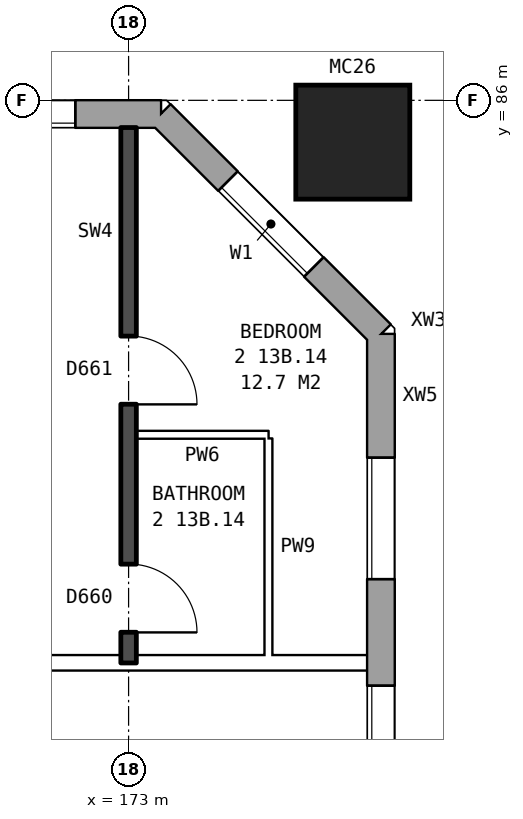
"""IFC4 building model, lengths in metres.
Left out: names, types, materials, properties, quantities, classifications, styles, units other than length and angle.
Written with IfcOpenShell. Run it as: python <this file> out.ifc"""

import sys

from ifc_helpers import new_model, si_unit, direction, frame, frame_2d, origin, origin_2d, place, context, subcontext, project, spatial, rectangle, hollow_rectangle, extrude, element, fill, save


model = new_model("IFC4")
c1 = context("Model", 3, precision=1e-05, world=origin(), true_north=direction((0.0, 1.0)))
c2 = subcontext(c1, "Body", "Model", "MODEL_VIEW")
j1 = project(units=[si_unit("LENGTHUNIT", "METRE"), si_unit("PLANEANGLEUNIT", "RADIAN")], contexts=[c1])
p1 = place(None, origin())
s1 = spatial("IfcSite", under=j1, at=p1, CompositionType="ELEMENT")
p2 = place(p1, origin())
s2 = spatial("IfcBuilding", under=s1, at=p2, CompositionType="ELEMENT")
p3 = place(p2, frame((0.0, 0.0, 50.5)))
s3 = spatial("IfcBuildingStorey", under=s2, at=p3, CompositionType="ELEMENT", Elevation=50.5)
p4 = place(p3, frame((175.95, 85.45, 0.0), z_axis=(0.0, 0.0, 1.0), x_axis=(1.0, 0.0, 0.0)))
e1 = element("IfcColumn", 1, at=p4, inside=s3, PredefinedType="COLUMN", context=c2, shape_type="SweptSolid", body=[
    extrude(hollow_rectangle(XDim=1.5, YDim=1.5, WallThickness=0.08, at=origin_2d()), origin(), (0.0, 0.0, 1.0), 3.1),
])
p5 = place(p3, frame((176.32, 57.075, 0.0), z_axis=(0.0, 0.0, 1.0), x_axis=(0.0, 1.0, 0.0)))
e2 = element("IfcWall", 2, at=p5, inside=s3, PredefinedType="STANDARD", context=c2, shape_type="SweptSolid", body=[
    extrude(rectangle(XDim=25.851, YDim=0.36, at=frame_2d((12.925, 0.0))), origin(), (0.0, 0.0, 1.0), 2.85),
])
p6 = place(p5, frame((1.625, 0.0, 0.8)))
e3 = element("IfcOpeningElement", 3, at=p6, cuts=e2, PredefinedType="OPENING", context=c2, shape_type="SweptSolid", body=[
    extrude(rectangle(XDim=1.6, YDim=1.8, at=frame_2d((0.8, 0.9))), frame((0.0, 0.19, 0.0), z_axis=(0.0, -1.0, 0.0), x_axis=(1.0, 0.0, 0.0)), (0.0, 0.0, 1.0), 0.38),
])
p7 = place(p5, frame((4.625, 0.0, 0.8)))
e4 = element("IfcOpeningElement", 4, at=p7, cuts=e2, PredefinedType="OPENING", context=c2, shape_type="SweptSolid", body=[
    extrude(rectangle(XDim=1.6, YDim=1.8, at=frame_2d((0.8, 0.9))), frame((0.0, 0.19, 0.0), z_axis=(0.0, -1.0, 0.0), x_axis=(1.0, 0.0, 0.0)), (0.0, 0.0, 1.0), 0.38),
])
p8 = place(p5, frame((6.525, 0.0, 0.8)))
e5 = element("IfcOpeningElement", 5, at=p8, cuts=e2, PredefinedType="OPENING", context=c2, shape_type="SweptSolid", body=[
    extrude(rectangle(XDim=1.6, YDim=1.8, at=frame_2d((0.8, 0.9))), frame((0.0, 0.19, 0.0), z_axis=(0.0, -1.0, 0.0), x_axis=(1.0, 0.0, 0.0)), (0.0, 0.0, 1.0), 0.38),
])
p9 = place(p5, frame((8.425, 0.0, 1.1)))
e6 = element("IfcOpeningElement", 6, at=p9, cuts=e2, PredefinedType="OPENING", context=c2, shape_type="SweptSolid", body=[
    extrude(rectangle(XDim=0.8, YDim=1.5, at=frame_2d((0.4, 0.75))), frame((0.0, 0.19, 0.0), z_axis=(0.0, -1.0, 0.0), x_axis=(1.0, 0.0, 0.0)), (0.0, 0.0, 1.0), 0.38),
])
p10 = place(p5, frame((9.525, 0.0, 1.6)))
e7 = element("IfcOpeningElement", 7, at=p10, cuts=e2, PredefinedType="OPENING", context=c2, shape_type="SweptSolid", body=[
    extrude(rectangle(XDim=0.6, YDim=0.9, at=frame_2d((0.3, 0.45))), frame((0.0, 0.19, 0.0), z_axis=(0.0, -1.0, 0.0), x_axis=(1.0, 0.0, 0.0)), (0.0, 0.0, 1.0), 0.38),
])
p11 = place(p5, frame((11.475, 0.0, 0.8)))
e8 = element("IfcOpeningElement", 8, at=p11, cuts=e2, PredefinedType="OPENING", context=c2, shape_type="SweptSolid", body=[
    extrude(rectangle(XDim=0.6, YDim=0.9, at=frame_2d((0.3, 0.45))), frame((0.0, 0.19, 0.0), z_axis=(0.0, -1.0, 0.0), x_axis=(1.0, 0.0, 0.0)), (0.0, 0.0, 1.0), 0.38),
])
p12 = place(p5, frame((19.625, 0.0, 0.8)))
e9 = element("IfcOpeningElement", 9, at=p12, cuts=e2, PredefinedType="OPENING", context=c2, shape_type="SweptSolid", body=[
    extrude(rectangle(XDim=1.6, YDim=1.8, at=frame_2d((0.8, 0.9))), frame((0.0, 0.19, 0.0), z_axis=(0.0, -1.0, 0.0), x_axis=(1.0, 0.0, 0.0)), (0.0, 0.0, 1.0), 0.38),
])
p13 = place(p5, frame((22.625, 0.0, 0.8)))
e10 = element("IfcOpeningElement", 10, at=p13, cuts=e2, PredefinedType="OPENING", context=c2, shape_type="SweptSolid", body=[
    extrude(rectangle(XDim=1.6, YDim=1.8, at=frame_2d((0.8, 0.9))), frame((0.0, 0.19, 0.0), z_axis=(0.0, -1.0, 0.0), x_axis=(1.0, 0.0, 0.0)), (0.0, 0.0, 1.0), 0.38),
])
p14 = place(p5, frame((12.375, 0.0, 0.8)))
e11 = element("IfcOpeningElement", 11, at=p14, cuts=e2, PredefinedType="OPENING", context=c2, shape_type="SweptSolid", body=[
    extrude(rectangle(XDim=1.0, YDim=1.8, at=frame_2d((0.5, 0.9))), frame((0.0, 0.19, 0.0), z_axis=(0.0, -1.0, 0.0), x_axis=(1.0, 0.0, 0.0)), (0.0, 0.0, 1.0), 0.38),
])
p15 = place(p5, frame((13.675, 0.0, 0.8)))
e12 = element("IfcOpeningElement", 12, at=p15, cuts=e2, PredefinedType="OPENING", context=c2, shape_type="SweptSolid", body=[
    extrude(rectangle(XDim=0.6, YDim=0.9, at=frame_2d((0.3, 0.45))), frame((0.0, 0.19, 0.0), z_axis=(0.0, -1.0, 0.0), x_axis=(1.0, 0.0, 0.0)), (0.0, 0.0, 1.0), 0.38),
])
p16 = place(p5, frame((15.575, 0.0, 1.7)))
e13 = element("IfcOpeningElement", 13, at=p16, cuts=e2, PredefinedType="OPENING", context=c2, shape_type="SweptSolid", body=[
    extrude(rectangle(XDim=0.6, YDim=0.9, at=frame_2d((0.3, 0.45))), frame((0.0, 0.19, 0.0), z_axis=(0.0, -1.0, 0.0), x_axis=(1.0, 0.0, 0.0)), (0.0, 0.0, 1.0), 0.38),
])
p17 = place(p5, frame((16.575, 0.0, 1.1)))
e14 = element("IfcOpeningElement", 14, at=p17, cuts=e2, PredefinedType="OPENING", context=c2, shape_type="SweptSolid", body=[
    extrude(rectangle(XDim=0.8, YDim=1.5, at=frame_2d((0.4, 0.75))), frame((0.0, 0.19, 0.0), z_axis=(0.0, -1.0, 0.0), x_axis=(1.0, 0.0, 0.0)), (0.0, 0.0, 1.0), 0.38),
])
p18 = place(p5, frame((17.675, 0.0, 0.8)))
e15 = element("IfcOpeningElement", 15, at=p18, cuts=e2, PredefinedType="OPENING", context=c2, shape_type="SweptSolid", body=[
    extrude(rectangle(XDim=1.6, YDim=1.8, at=frame_2d((0.8, 0.9))), frame((0.0, 0.19, 0.0), z_axis=(0.0, -1.0, 0.0), x_axis=(1.0, 0.0, 0.0)), (0.0, 0.0, 1.0), 0.38),
])
p19 = place(p3, frame((176.32, 82.925, 0.0), z_axis=(0.0, 0.0, 1.0), x_axis=(-0.707106781187, 0.707106781187, 0.0)))
e16 = element("IfcWall", 16, at=p19, inside=s3, PredefinedType="STANDARD", context=c2, shape_type="SweptSolid", body=[
    extrude(rectangle(XDim=4.094, YDim=0.36, at=frame_2d((2.047, 0.0))), origin(), (0.0, 0.0, 1.0), 2.85),
])
p20 = place(p19, frame((1.247, 0.0, 0.8)))
e17 = element("IfcOpeningElement", 17, at=p20, cuts=e16, PredefinedType="OPENING", context=c2, shape_type="SweptSolid", body=[
    extrude(rectangle(XDim=1.6, YDim=1.8, at=frame_2d((0.8, 0.9))), frame((0.0, 0.19, 0.0), z_axis=(0.0, -1.0, 0.0), x_axis=(1.0, 0.0, 0.0)), (0.0, 0.0, 1.0), 0.38),
])
p21 = place(p3, frame((173.425, 85.82, 0.0), z_axis=(0.0, 0.0, 1.0), x_axis=(-1.0, 0.0, 0.0)))
e18 = element("IfcWall", 18, at=p21, inside=s3, PredefinedType="STANDARD", context=c2, shape_type="SweptSolid", body=[
    extrude(rectangle(XDim=39.351, YDim=0.36, at=frame_2d((19.675, 0.0))), origin(), (0.0, 0.0, 1.0), 2.85),
])
p22 = place(p21, frame((1.125, 0.0, 0.8)))
e19 = element("IfcOpeningElement", 19, at=p22, cuts=e18, PredefinedType="OPENING", context=c2, shape_type="SweptSolid", body=[
    extrude(rectangle(XDim=1.6, YDim=1.8, at=frame_2d((0.8, 0.9))), frame((0.0, 0.19, 0.0), z_axis=(0.0, -1.0, 0.0), x_axis=(1.0, 0.0, 0.0)), (0.0, 0.0, 1.0), 0.38),
])
p23 = place(p21, frame((4.125, 0.0, 0.8)))
e20 = element("IfcOpeningElement", 20, at=p23, cuts=e18, PredefinedType="OPENING", context=c2, shape_type="SweptSolid", body=[
    extrude(rectangle(XDim=1.6, YDim=1.8, at=frame_2d((0.8, 0.9))), frame((0.0, 0.19, 0.0), z_axis=(0.0, -1.0, 0.0), x_axis=(1.0, 0.0, 0.0)), (0.0, 0.0, 1.0), 0.38),
])
p24 = place(p21, frame((7.725, 0.0, 0.8)))
e21 = element("IfcOpeningElement", 21, at=p24, cuts=e18, PredefinedType="OPENING", context=c2, shape_type="SweptSolid", body=[
    extrude(rectangle(XDim=0.6, YDim=0.9, at=frame_2d((0.3, 0.45))), frame((0.0, 0.19, 0.0), z_axis=(0.0, -1.0, 0.0), x_axis=(1.0, 0.0, 0.0)), (0.0, 0.0, 1.0), 0.38),
])
p25 = place(p21, frame((10.125, 0.0, 0.8)))
e22 = element("IfcOpeningElement", 22, at=p25, cuts=e18, PredefinedType="OPENING", context=c2, shape_type="SweptSolid", body=[
    extrude(rectangle(XDim=1.6, YDim=1.8, at=frame_2d((0.8, 0.9))), frame((0.0, 0.19, 0.0), z_axis=(0.0, -1.0, 0.0), x_axis=(1.0, 0.0, 0.0)), (0.0, 0.0, 1.0), 0.38),
])
p26 = place(p21, frame((13.125, 0.0, 0.8)))
e23 = element("IfcOpeningElement", 23, at=p26, cuts=e18, PredefinedType="OPENING", context=c2, shape_type="SweptSolid", body=[
    extrude(rectangle(XDim=1.6, YDim=1.8, at=frame_2d((0.8, 0.9))), frame((0.0, 0.19, 0.0), z_axis=(0.0, -1.0, 0.0), x_axis=(1.0, 0.0, 0.0)), (0.0, 0.0, 1.0), 0.38),
])
p27 = place(p21, frame((16.125, 0.0, 0.8)))
e24 = element("IfcOpeningElement", 24, at=p27, cuts=e18, PredefinedType="OPENING", context=c2, shape_type="SweptSolid", body=[
    extrude(rectangle(XDim=1.6, YDim=1.8, at=frame_2d((0.8, 0.9))), frame((0.0, 0.19, 0.0), z_axis=(0.0, -1.0, 0.0), x_axis=(1.0, 0.0, 0.0)), (0.0, 0.0, 1.0), 0.38),
])
p28 = place(p21, frame((19.125, 0.0, 0.8)))
e25 = element("IfcOpeningElement", 25, at=p28, cuts=e18, PredefinedType="OPENING", context=c2, shape_type="SweptSolid", body=[
    extrude(rectangle(XDim=1.6, YDim=1.8, at=frame_2d((0.8, 0.9))), frame((0.0, 0.19, 0.0), z_axis=(0.0, -1.0, 0.0), x_axis=(1.0, 0.0, 0.0)), (0.0, 0.0, 1.0), 0.38),
])
p29 = place(p21, frame((22.125, 0.0, 0.8)))
e26 = element("IfcOpeningElement", 26, at=p29, cuts=e18, PredefinedType="OPENING", context=c2, shape_type="SweptSolid", body=[
    extrude(rectangle(XDim=1.6, YDim=1.8, at=frame_2d((0.8, 0.9))), frame((0.0, 0.19, 0.0), z_axis=(0.0, -1.0, 0.0), x_axis=(1.0, 0.0, 0.0)), (0.0, 0.0, 1.0), 0.38),
])
p30 = place(p21, frame((25.125, 0.0, 0.8)))
e27 = element("IfcOpeningElement", 27, at=p30, cuts=e18, PredefinedType="OPENING", context=c2, shape_type="SweptSolid", body=[
    extrude(rectangle(XDim=1.6, YDim=1.8, at=frame_2d((0.8, 0.9))), frame((0.0, 0.19, 0.0), z_axis=(0.0, -1.0, 0.0), x_axis=(1.0, 0.0, 0.0)), (0.0, 0.0, 1.0), 0.38),
])
p31 = place(p21, frame((28.125, 0.0, 0.8)))
e28 = element("IfcOpeningElement", 28, at=p31, cuts=e18, PredefinedType="OPENING", context=c2, shape_type="SweptSolid", body=[
    extrude(rectangle(XDim=1.6, YDim=1.8, at=frame_2d((0.8, 0.9))), frame((0.0, 0.19, 0.0), z_axis=(0.0, -1.0, 0.0), x_axis=(1.0, 0.0, 0.0)), (0.0, 0.0, 1.0), 0.38),
])
p32 = place(p21, frame((30.625, 0.0, 0.8)))
e29 = element("IfcOpeningElement", 29, at=p32, cuts=e18, PredefinedType="OPENING", context=c2, shape_type="SweptSolid", body=[
    extrude(rectangle(XDim=1.0, YDim=0.9, at=frame_2d((0.5, 0.45))), frame((0.0, 0.19, 0.0), z_axis=(0.0, -1.0, 0.0), x_axis=(1.0, 0.0, 0.0)), (0.0, 0.0, 1.0), 0.38),
])
p33 = place(p21, frame((34.125, 0.0, 0.8)))
e30 = element("IfcOpeningElement", 30, at=p33, cuts=e18, PredefinedType="OPENING", context=c2, shape_type="SweptSolid", body=[
    extrude(rectangle(XDim=1.6, YDim=1.8, at=frame_2d((0.8, 0.9))), frame((0.0, 0.19, 0.0), z_axis=(0.0, -1.0, 0.0), x_axis=(1.0, 0.0, 0.0)), (0.0, 0.0, 1.0), 0.38),
])
p34 = place(p21, frame((37.125, 0.0, 0.8)))
e31 = element("IfcOpeningElement", 31, at=p34, cuts=e18, PredefinedType="OPENING", context=c2, shape_type="SweptSolid", body=[
    extrude(rectangle(XDim=1.6, YDim=1.8, at=frame_2d((0.8, 0.9))), frame((0.0, 0.19, 0.0), z_axis=(0.0, -1.0, 0.0), x_axis=(1.0, 0.0, 0.0)), (0.0, 0.0, 1.0), 0.38),
])
p35 = place(p21, frame((8.625, 0.0, 0.8)))
e32 = element("IfcOpeningElement", 32, at=p35, cuts=e18, PredefinedType="OPENING", context=c2, shape_type="SweptSolid", body=[
    extrude(rectangle(XDim=0.6, YDim=1.5, at=frame_2d((0.3, 0.75))), frame((0.0, 0.19, 0.0), z_axis=(0.0, -1.0, 0.0), x_axis=(1.0, 0.0, 0.0)), (0.0, 0.0, 1.0), 0.38),
])
p36 = place(p21, frame((32.875, 0.0, 1.7)))
e33 = element("IfcOpeningElement", 33, at=p36, cuts=e18, PredefinedType="OPENING", context=c2, shape_type="SweptSolid", body=[
    extrude(rectangle(XDim=0.8, YDim=0.9, at=frame_2d((0.4, 0.45))), frame((0.0, 0.19, 0.0), z_axis=(0.0, -1.0, 0.0), x_axis=(1.0, 0.0, 0.0)), (0.0, 0.0, 1.0), 0.38),
])
p37 = place(p3, frame((155.1, 78.6, 0.0), z_axis=(0.0, 0.0, 1.0), x_axis=(1.0, 0.0, 0.0)))
e34 = element("IfcWall", 34, at=p37, inside=s3, PredefinedType="PARTITIONING", context=c2, shape_type="SweptSolid", body=[
    extrude(rectangle(XDim=21.04, YDim=0.2, at=frame_2d((10.52, 0.0))), origin(), (0.0, 0.0, 1.0), 2.85),
])
p38 = place(p37, frame((2.45, 0.0, 0.0)))
e35 = element("IfcOpeningElement", 35, at=p38, cuts=e34, PredefinedType="OPENING", context=c2, shape_type="SweptSolid", body=[
    extrude(rectangle(XDim=1.0, YDim=2.1, at=frame_2d((0.5, 1.05))), frame((0.0, 0.11, 0.0), z_axis=(0.0, -1.0, 0.0), x_axis=(1.0, 0.0, 0.0)), (0.0, 0.0, 1.0), 0.22),
])
p39 = place(p37, frame((14.4, 0.0, 0.0)))
e36 = element("IfcOpeningElement", 36, at=p39, cuts=e34, PredefinedType="OPENING", context=c2, shape_type="SweptSolid", body=[
    extrude(rectangle(XDim=1.0, YDim=2.1, at=frame_2d((0.5, 1.05))), frame((0.0, 0.11, 0.0), z_axis=(0.0, -1.0, 0.0), x_axis=(1.0, 0.0, 0.0)), (0.0, 0.0, 1.0), 0.22),
])
p40 = place(p3, frame((173.1, 81.6, 0.0), z_axis=(0.0, 0.0, 1.0), x_axis=(1.0, 0.0, 0.0)))
e37 = element("IfcWall", 37, at=p40, inside=s3, PredefinedType="PARTITIONING", context=c2, shape_type="SweptSolid", body=[
    extrude(rectangle(XDim=1.74, YDim=0.1, at=frame_2d((0.87, 0.0))), origin(), (0.0, 0.0, 1.0), 2.85),
])
p41 = place(p3, frame((173.0, 78.6, 0.0), z_axis=(0.0, 0.0, 1.0), x_axis=(0.0, 1.0, 0.0)))
e38 = element("IfcWall", 38, at=p41, inside=s3, PredefinedType="SOLIDWALL", context=c2, shape_type="SweptSolid", body=[
    extrude(rectangle(XDim=7.04, YDim=0.2, at=frame_2d((3.52, 0.0))), origin(), (0.0, 0.0, 1.0), 2.85),
])
p42 = place(p41, frame((3.4, 0.0, 0.0)))
e39 = element("IfcOpeningElement", 39, at=p42, cuts=e38, PredefinedType="OPENING", context=c2, shape_type="SweptSolid", body=[
    extrude(rectangle(XDim=0.9, YDim=2.1, at=frame_2d((0.45, 1.05))), frame((0.0, 0.11, 0.0), z_axis=(0.0, -1.0, 0.0), x_axis=(1.0, 0.0, 0.0)), (0.0, 0.0, 1.0), 0.22),
])
p43 = place(p41, frame((0.4, 0.0, 0.0)))
e40 = element("IfcOpeningElement", 40, at=p43, cuts=e38, PredefinedType="OPENING", context=c2, shape_type="SweptSolid", body=[
    extrude(rectangle(XDim=0.9, YDim=2.1, at=frame_2d((0.45, 1.05))), frame((0.0, 0.11, 0.0), z_axis=(0.0, -1.0, 0.0), x_axis=(1.0, 0.0, 0.0)), (0.0, 0.0, 1.0), 0.22),
])
p44 = place(p3, frame((174.84, 78.7, 0.0), z_axis=(0.0, 0.0, 1.0), x_axis=(0.0, 1.0, 0.0)))
e41 = element("IfcWall", 41, at=p44, inside=s3, PredefinedType="PARTITIONING", context=c2, shape_type="SweptSolid", body=[
    extrude(rectangle(XDim=2.85, YDim=0.1, at=frame_2d((1.425, 0.0))), origin(), (0.0, 0.0, 1.0), 2.85),
])
p45 = place(p12, origin())
e42 = element("IfcWindow", 42, at=p45, inside=s3, PartitioningType="SINGLE_PANEL", PredefinedType="WINDOW", context=c2, shape_type="SweptSolid", body=[
    extrude(rectangle(XDim=1.6, YDim=1.8, at=frame_2d((0.8, 0.9))), frame((0.0, 0.15, 0.0), z_axis=(0.0, -1.0, 0.0), x_axis=(1.0, 0.0, 0.0)), (0.0, 0.0, 1.0), 0.06),
])
fill(e9, e42)
p46 = place(p13, origin())
e43 = element("IfcWindow", 43, at=p46, inside=s3, PartitioningType="SINGLE_PANEL", PredefinedType="WINDOW", context=c2, shape_type="SweptSolid", body=[
    extrude(rectangle(XDim=1.6, YDim=1.8, at=frame_2d((0.8, 0.9))), frame((0.0, 0.15, 0.0), z_axis=(0.0, -1.0, 0.0), x_axis=(1.0, 0.0, 0.0)), (0.0, 0.0, 1.0), 0.06),
])
fill(e10, e43)
p47 = place(p20, origin())
e44 = element("IfcWindow", 44, at=p47, inside=s3, PartitioningType="SINGLE_PANEL", PredefinedType="WINDOW", context=c2, shape_type="SweptSolid", body=[
    extrude(rectangle(XDim=1.6, YDim=1.8, at=frame_2d((0.8, 0.9))), frame((0.0, 0.15, 0.0), z_axis=(0.0, -1.0, 0.0), x_axis=(1.0, 0.0, 0.0)), (0.0, 0.0, 1.0), 0.06),
])
fill(e17, e44)
p48 = place(p22, origin())
e45 = element("IfcWindow", 45, at=p48, inside=s3, PartitioningType="SINGLE_PANEL", PredefinedType="WINDOW", context=c2, shape_type="SweptSolid", body=[
    extrude(rectangle(XDim=1.6, YDim=1.8, at=frame_2d((0.8, 0.9))), frame((0.0, 0.15, 0.0), z_axis=(0.0, -1.0, 0.0), x_axis=(1.0, 0.0, 0.0)), (0.0, 0.0, 1.0), 0.06),
])
fill(e19, e45)
p49 = place(p42, frame((0.9, 0.0, 0.0), z_axis=(0.0, 0.0, 1.0), x_axis=(-1.0, 0.0, 0.0)))
e46 = element("IfcDoor", 46, at=p49, inside=s3, OperationType="SINGLE_SWING_RIGHT", PredefinedType="DOOR", context=c2, shape_type="SweptSolid", body=[
    extrude(rectangle(XDim=0.9, YDim=2.1, at=frame_2d((0.45, 1.05))), frame((0.0, 0.025, 0.0), z_axis=(0.0, -1.0, 0.0), x_axis=(1.0, 0.0, 0.0)), (0.0, 0.0, 1.0), 0.05),
])
fill(e39, e46)
p50 = place(p43, frame((0.9, 0.0, 0.0), z_axis=(0.0, 0.0, 1.0), x_axis=(-1.0, 0.0, 0.0)))
e47 = element("IfcDoor", 47, at=p50, inside=s3, OperationType="SINGLE_SWING_RIGHT", PredefinedType="DOOR", context=c2, shape_type="SweptSolid", body=[
    extrude(rectangle(XDim=0.9, YDim=2.1, at=frame_2d((0.45, 1.05))), frame((0.0, 0.025, 0.0), z_axis=(0.0, -1.0, 0.0), x_axis=(1.0, 0.0, 0.0)), (0.0, 0.0, 1.0), 0.05),
])
fill(e40, e47)
save(model, sys.argv[1])
